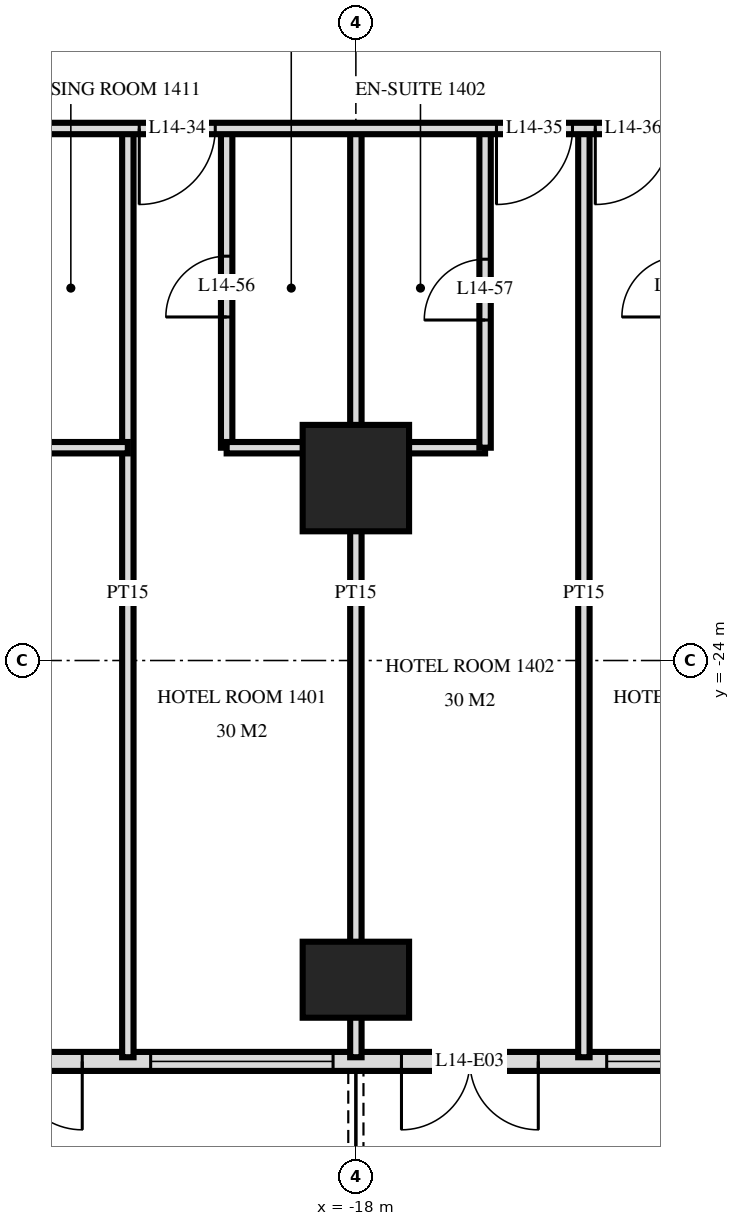
"""IFC4 building model, lengths in metres.
Left out: names, types, materials, properties, quantities, classifications, styles, units other than length and angle.
Written with IfcOpenShell. Run it as: python <this file> out.ifc"""

import sys

from ifc_helpers import new_model, si_unit, direction, frame, frame_2d, origin, origin_2d, place, context, subcontext, project, spatial, rectangle, extrude, element, fill, save


model = new_model("IFC4")
c1 = context("Model", 3, precision=1e-05, world=origin(), true_north=direction((0.0, 1.0)))
c2 = subcontext(c1, "Body", "Model", "MODEL_VIEW")
j1 = project(units=[si_unit("LENGTHUNIT", "METRE"), si_unit("PLANEANGLEUNIT", "RADIAN")], contexts=[c1])
p1 = place(None, origin())
s1 = spatial("IfcSite", under=j1, at=p1, CompositionType="ELEMENT")
p2 = place(p1, origin())
s2 = spatial("IfcBuilding", under=s1, at=p2, CompositionType="ELEMENT")
p3 = place(p2, frame((0.0, 0.0, 60.0)))
s3 = spatial("IfcBuildingStorey", under=s2, at=p3, CompositionType="ELEMENT", Elevation=60.0)
p4 = place(p3, frame((-18.0, -28.2, 0.0), z_axis=(0.0, 0.0, 1.0), x_axis=(1.0, 0.0, 0.0)))
e1 = element("IfcColumn", 1, at=p4, inside=s3, PredefinedType="COLUMN", context=c2, shape_type="SweptSolid", body=[
    extrude(rectangle(XDim=1.4, YDim=1.0, at=origin_2d()), origin(), (0.0, 0.0, 1.0), 3.6),
])
p5 = place(p3, frame((-18.0, -21.6, 0.0), z_axis=(0.0, 0.0, 1.0), x_axis=(1.0, 0.0, 0.0)))
e2 = element("IfcColumn", 2, at=p5, inside=s3, PredefinedType="COLUMN", context=c2, shape_type="SweptSolid", body=[
    extrude(rectangle(XDim=1.4, YDim=1.4, at=origin_2d()), origin(), (0.0, 0.0, 1.0), 3.6),
])
p6 = place(p3, frame((-28.775, -29.275, 0.0), z_axis=(0.0, 0.0, 1.0), x_axis=(1.0, 0.0, 0.0)))
e3 = element("IfcWall", 3, at=p6, inside=s3, PredefinedType="SOLIDWALL", context=c2, shape_type="SweptSolid", body=[
    extrude(rectangle(XDim=57.551, YDim=0.25, at=frame_2d((28.775, 0.0))), origin(), (0.0, 0.0, 1.0), 3.32),
])
p7 = place(p6, frame((0.575, 0.0, 0.0)))
e4 = element("IfcOpeningElement", 4, at=p7, cuts=e3, PredefinedType="OPENING", context=c2, shape_type="SweptSolid", body=[
    extrude(rectangle(XDim=1.8, YDim=2.4, at=frame_2d((0.9, 1.2))), frame((0.0, 0.135, 0.0), z_axis=(0.0, -1.0, 0.0), x_axis=(1.0, 0.0, 0.0)), (0.0, 0.0, 1.0), 0.27),
])
p8 = place(p6, frame((5.375, 0.0, 0.0)))
e5 = element("IfcOpeningElement", 5, at=p8, cuts=e3, PredefinedType="OPENING", context=c2, shape_type="SweptSolid", body=[
    extrude(rectangle(XDim=1.8, YDim=2.4, at=frame_2d((0.9, 1.2))), frame((0.0, 0.135, 0.0), z_axis=(0.0, -1.0, 0.0), x_axis=(1.0, 0.0, 0.0)), (0.0, 0.0, 1.0), 0.27),
])
p9 = place(p6, frame((8.075, 0.0, 0.3)))
e6 = element("IfcOpeningElement", 6, at=p9, cuts=e3, PredefinedType="OPENING", context=c2, shape_type="SweptSolid", body=[
    extrude(rectangle(XDim=2.4, YDim=2.1, at=frame_2d((1.2, 1.05))), frame((0.0, 0.135, 0.0), z_axis=(0.0, -1.0, 0.0), x_axis=(1.0, 0.0, 0.0)), (0.0, 0.0, 1.0), 0.27),
])
p10 = place(p6, frame((11.375, 0.0, 0.0)))
e7 = element("IfcOpeningElement", 7, at=p10, cuts=e3, PredefinedType="OPENING", context=c2, shape_type="SweptSolid", body=[
    extrude(rectangle(XDim=1.8, YDim=2.4, at=frame_2d((0.9, 1.2))), frame((0.0, 0.135, 0.0), z_axis=(0.0, -1.0, 0.0), x_axis=(1.0, 0.0, 0.0)), (0.0, 0.0, 1.0), 0.27),
])
p11 = place(p6, frame((14.075, 0.0, 0.3)))
e8 = element("IfcOpeningElement", 8, at=p11, cuts=e3, PredefinedType="OPENING", context=c2, shape_type="SweptSolid", body=[
    extrude(rectangle(XDim=2.4, YDim=2.1, at=frame_2d((1.2, 1.05))), frame((0.0, 0.135, 0.0), z_axis=(0.0, -1.0, 0.0), x_axis=(1.0, 0.0, 0.0)), (0.0, 0.0, 1.0), 0.27),
])
p12 = place(p6, frame((17.375, 0.0, 0.0)))
e9 = element("IfcOpeningElement", 9, at=p12, cuts=e3, PredefinedType="OPENING", context=c2, shape_type="SweptSolid", body=[
    extrude(rectangle(XDim=1.8, YDim=2.4, at=frame_2d((0.9, 1.2))), frame((0.0, 0.135, 0.0), z_axis=(0.0, -1.0, 0.0), x_axis=(1.0, 0.0, 0.0)), (0.0, 0.0, 1.0), 0.27),
])
p13 = place(p6, frame((20.075, 0.0, 0.3)))
e10 = element("IfcOpeningElement", 10, at=p13, cuts=e3, PredefinedType="OPENING", context=c2, shape_type="SweptSolid", body=[
    extrude(rectangle(XDim=2.4, YDim=2.1, at=frame_2d((1.2, 1.05))), frame((0.0, 0.135, 0.0), z_axis=(0.0, -1.0, 0.0), x_axis=(1.0, 0.0, 0.0)), (0.0, 0.0, 1.0), 0.27),
])
p14 = place(p6, frame((23.075, 0.0, 0.3)))
e11 = element("IfcOpeningElement", 11, at=p14, cuts=e3, PredefinedType="OPENING", context=c2, shape_type="SweptSolid", body=[
    extrude(rectangle(XDim=2.4, YDim=2.1, at=frame_2d((1.2, 1.05))), frame((0.0, 0.135, 0.0), z_axis=(0.0, -1.0, 0.0), x_axis=(1.0, 0.0, 0.0)), (0.0, 0.0, 1.0), 0.27),
])
p15 = place(p6, frame((26.375, 0.0, 0.0)))
e12 = element("IfcOpeningElement", 12, at=p15, cuts=e3, PredefinedType="OPENING", context=c2, shape_type="SweptSolid", body=[
    extrude(rectangle(XDim=1.8, YDim=2.4, at=frame_2d((0.9, 1.2))), frame((0.0, 0.135, 0.0), z_axis=(0.0, -1.0, 0.0), x_axis=(1.0, 0.0, 0.0)), (0.0, 0.0, 1.0), 0.27),
])
p16 = place(p6, frame((29.075, 0.0, 0.3)))
e13 = element("IfcOpeningElement", 13, at=p16, cuts=e3, PredefinedType="OPENING", context=c2, shape_type="SweptSolid", body=[
    extrude(rectangle(XDim=2.4, YDim=2.1, at=frame_2d((1.2, 1.05))), frame((0.0, 0.135, 0.0), z_axis=(0.0, -1.0, 0.0), x_axis=(1.0, 0.0, 0.0)), (0.0, 0.0, 1.0), 0.27),
])
p17 = place(p6, frame((32.375, 0.0, 0.0)))
e14 = element("IfcOpeningElement", 14, at=p17, cuts=e3, PredefinedType="OPENING", context=c2, shape_type="SweptSolid", body=[
    extrude(rectangle(XDim=1.8, YDim=2.4, at=frame_2d((0.9, 1.2))), frame((0.0, 0.135, 0.0), z_axis=(0.0, -1.0, 0.0), x_axis=(1.0, 0.0, 0.0)), (0.0, 0.0, 1.0), 0.27),
])
p18 = place(p6, frame((35.375, 0.0, 0.0)))
e15 = element("IfcOpeningElement", 15, at=p18, cuts=e3, PredefinedType="OPENING", context=c2, shape_type="SweptSolid", body=[
    extrude(rectangle(XDim=1.8, YDim=2.4, at=frame_2d((0.9, 1.2))), frame((0.0, 0.135, 0.0), z_axis=(0.0, -1.0, 0.0), x_axis=(1.0, 0.0, 0.0)), (0.0, 0.0, 1.0), 0.27),
])
p19 = place(p6, frame((38.075, 0.0, 0.3)))
e16 = element("IfcOpeningElement", 16, at=p19, cuts=e3, PredefinedType="OPENING", context=c2, shape_type="SweptSolid", body=[
    extrude(rectangle(XDim=2.4, YDim=2.1, at=frame_2d((1.2, 1.05))), frame((0.0, 0.135, 0.0), z_axis=(0.0, -1.0, 0.0), x_axis=(1.0, 0.0, 0.0)), (0.0, 0.0, 1.0), 0.27),
])
p20 = place(p6, frame((41.375, 0.0, 0.0)))
e17 = element("IfcOpeningElement", 17, at=p20, cuts=e3, PredefinedType="OPENING", context=c2, shape_type="SweptSolid", body=[
    extrude(rectangle(XDim=1.8, YDim=2.4, at=frame_2d((0.9, 1.2))), frame((0.0, 0.135, 0.0), z_axis=(0.0, -1.0, 0.0), x_axis=(1.0, 0.0, 0.0)), (0.0, 0.0, 1.0), 0.27),
])
p21 = place(p6, frame((44.075, 0.0, 0.3)))
e18 = element("IfcOpeningElement", 18, at=p21, cuts=e3, PredefinedType="OPENING", context=c2, shape_type="SweptSolid", body=[
    extrude(rectangle(XDim=2.4, YDim=2.1, at=frame_2d((1.2, 1.05))), frame((0.0, 0.135, 0.0), z_axis=(0.0, -1.0, 0.0), x_axis=(1.0, 0.0, 0.0)), (0.0, 0.0, 1.0), 0.27),
])
p22 = place(p6, frame((47.075, 0.0, 0.3)))
e19 = element("IfcOpeningElement", 19, at=p22, cuts=e3, PredefinedType="OPENING", context=c2, shape_type="SweptSolid", body=[
    extrude(rectangle(XDim=2.4, YDim=2.1, at=frame_2d((1.2, 1.05))), frame((0.0, 0.135, 0.0), z_axis=(0.0, -1.0, 0.0), x_axis=(1.0, 0.0, 0.0)), (0.0, 0.0, 1.0), 0.27),
])
p23 = place(p6, frame((50.375, 0.0, 0.0)))
e20 = element("IfcOpeningElement", 20, at=p23, cuts=e3, PredefinedType="OPENING", context=c2, shape_type="SweptSolid", body=[
    extrude(rectangle(XDim=1.8, YDim=2.4, at=frame_2d((0.9, 1.2))), frame((0.0, 0.135, 0.0), z_axis=(0.0, -1.0, 0.0), x_axis=(1.0, 0.0, 0.0)), (0.0, 0.0, 1.0), 0.27),
])
p24 = place(p6, frame((53.375, 0.0, 0.0)))
e21 = element("IfcOpeningElement", 21, at=p24, cuts=e3, PredefinedType="OPENING", context=c2, shape_type="SweptSolid", body=[
    extrude(rectangle(XDim=1.8, YDim=2.4, at=frame_2d((0.9, 1.2))), frame((0.0, 0.135, 0.0), z_axis=(0.0, -1.0, 0.0), x_axis=(1.0, 0.0, 0.0)), (0.0, 0.0, 1.0), 0.27),
])
p25 = place(p3, frame((-15.0, -29.22, 0.0), z_axis=(0.0, 0.0, 1.0), x_axis=(0.0, 1.0, 0.0)))
e22 = element("IfcWall", 22, at=p25, inside=s3, PredefinedType="PARTITIONING", context=c2, shape_type="SweptSolid", body=[
    extrude(rectangle(XDim=12.22, YDim=0.15, at=frame_2d((6.11, 0.0))), origin(), (0.0, 0.0, 1.0), 3.32),
])
p26 = place(p3, frame((-16.3, -21.2, 0.0), z_axis=(0.0, 0.0, 1.0), x_axis=(0.0, 1.0, 0.0)))
e23 = element("IfcWall", 23, at=p26, inside=s3, PredefinedType="PARTITIONING", context=c2, shape_type="SweptSolid", body=[
    extrude(rectangle(XDim=4.2, YDim=0.15, at=frame_2d((2.1, 0.0))), origin(), (0.0, 0.0, 1.0), 3.32),
])
p27 = place(p26, frame((1.68, 0.0, 0.0)))
e24 = element("IfcOpeningElement", 24, at=p27, cuts=e23, PredefinedType="OPENING", context=c2, shape_type="SweptSolid", body=[
    extrude(rectangle(XDim=0.8, YDim=2.1, at=frame_2d((0.4, 1.05))), frame((0.0, 0.085, 0.0), z_axis=(0.0, -1.0, 0.0), x_axis=(1.0, 0.0, 0.0)), (0.0, 0.0, 1.0), 0.17),
])
p28 = place(p3, frame((-18.0, -29.22, 0.0), z_axis=(0.0, 0.0, 1.0), x_axis=(0.0, 1.0, 0.0)))
e25 = element("IfcWall", 25, at=p28, inside=s3, PredefinedType="PARTITIONING", context=c2, shape_type="SweptSolid", body=[
    extrude(rectangle(XDim=12.22, YDim=0.15, at=frame_2d((6.11, 0.0))), origin(), (0.0, 0.0, 1.0), 3.32),
])
p29 = place(p3, frame((-19.7, -21.2, 0.0), z_axis=(0.0, 0.0, 1.0), x_axis=(0.0, 1.0, 0.0)))
e26 = element("IfcWall", 26, at=p29, inside=s3, PredefinedType="PARTITIONING", context=c2, shape_type="SweptSolid", body=[
    extrude(rectangle(XDim=4.2, YDim=0.15, at=frame_2d((2.1, 0.0))), origin(), (0.0, 0.0, 1.0), 3.32),
])
p30 = place(p29, frame((1.72, 0.0, 0.0)))
e27 = element("IfcOpeningElement", 27, at=p30, cuts=e26, PredefinedType="OPENING", context=c2, shape_type="SweptSolid", body=[
    extrude(rectangle(XDim=0.8, YDim=2.1, at=frame_2d((0.4, 1.05))), frame((0.0, 0.085, 0.0), z_axis=(0.0, -1.0, 0.0), x_axis=(1.0, 0.0, 0.0)), (0.0, 0.0, 1.0), 0.17),
])
p31 = place(p3, frame((-21.0, -29.22, 0.0), z_axis=(0.0, 0.0, 1.0), x_axis=(0.0, 1.0, 0.0)))
e28 = element("IfcWall", 28, at=p31, inside=s3, PredefinedType="PARTITIONING", context=c2, shape_type="SweptSolid", body=[
    extrude(rectangle(XDim=12.22, YDim=0.15, at=frame_2d((6.11, 0.0))), origin(), (0.0, 0.0, 1.0), 3.32),
])
p32 = place(p3, frame((-22.5, -21.2, 0.0), z_axis=(0.0, 0.0, 1.0), x_axis=(1.0, 0.0, 0.0)))
e29 = element("IfcWall", 29, at=p32, inside=s3, PredefinedType="PARTITIONING", context=c2, shape_type="SweptSolid", body=[
    extrude(rectangle(XDim=1.5, YDim=0.15, at=frame_2d((0.75, 0.0))), origin(), (0.0, 0.0, 1.0), 3.32),
])
p33 = place(p3, frame((-19.7, -21.2, 0.0), z_axis=(0.0, 0.0, 1.0), x_axis=(1.0, 0.0, 0.0)))
e30 = element("IfcWall", 30, at=p33, inside=s3, PredefinedType="PARTITIONING", context=c2, shape_type="SweptSolid", body=[
    extrude(rectangle(XDim=3.4, YDim=0.15, at=frame_2d((1.7, 0.0))), origin(), (0.0, 0.0, 1.0), 3.32),
])
p34 = place(p3, frame((-33.12, -17.0, 0.0), z_axis=(0.0, 0.0, 1.0), x_axis=(1.0, 0.0, 0.0)))
e31 = element("IfcWall", 31, at=p34, inside=s3, PredefinedType="PARTITIONING", context=c2, shape_type="SweptSolid", body=[
    extrude(rectangle(XDim=66.24, YDim=0.15, at=frame_2d((33.12, 0.0))), origin(), (0.0, 0.0, 1.0), 3.32),
])
p35 = place(p34, frame((12.27, 0.0, 0.0)))
e32 = element("IfcOpeningElement", 32, at=p35, cuts=e31, PredefinedType="OPENING", context=c2, shape_type="SweptSolid", body=[
    extrude(rectangle(XDim=1.0, YDim=2.1, at=frame_2d((0.5, 1.05))), frame((0.0, 0.085, 0.0), z_axis=(0.0, -1.0, 0.0), x_axis=(1.0, 0.0, 0.0)), (0.0, 0.0, 1.0), 0.17),
])
p36 = place(p34, frame((16.97, 0.0, 0.0)))
e33 = element("IfcOpeningElement", 33, at=p36, cuts=e31, PredefinedType="OPENING", context=c2, shape_type="SweptSolid", body=[
    extrude(rectangle(XDim=1.0, YDim=2.1, at=frame_2d((0.5, 1.05))), frame((0.0, 0.085, 0.0), z_axis=(0.0, -1.0, 0.0), x_axis=(1.0, 0.0, 0.0)), (0.0, 0.0, 1.0), 0.17),
])
p37 = place(p34, frame((18.27, 0.0, 0.0)))
e34 = element("IfcOpeningElement", 34, at=p37, cuts=e31, PredefinedType="OPENING", context=c2, shape_type="SweptSolid", body=[
    extrude(rectangle(XDim=1.0, YDim=2.1, at=frame_2d((0.5, 1.05))), frame((0.0, 0.085, 0.0), z_axis=(0.0, -1.0, 0.0), x_axis=(1.0, 0.0, 0.0)), (0.0, 0.0, 1.0), 0.17),
])
p38 = place(p34, frame((22.97, 0.0, 0.0)))
e35 = element("IfcOpeningElement", 35, at=p38, cuts=e31, PredefinedType="OPENING", context=c2, shape_type="SweptSolid", body=[
    extrude(rectangle(XDim=1.0, YDim=2.1, at=frame_2d((0.5, 1.05))), frame((0.0, 0.085, 0.0), z_axis=(0.0, -1.0, 0.0), x_axis=(1.0, 0.0, 0.0)), (0.0, 0.0, 1.0), 0.17),
])
p39 = place(p34, frame((24.27, 0.0, 0.0)))
e36 = element("IfcOpeningElement", 36, at=p39, cuts=e31, PredefinedType="OPENING", context=c2, shape_type="SweptSolid", body=[
    extrude(rectangle(XDim=1.0, YDim=2.1, at=frame_2d((0.5, 1.05))), frame((0.0, 0.085, 0.0), z_axis=(0.0, -1.0, 0.0), x_axis=(1.0, 0.0, 0.0)), (0.0, 0.0, 1.0), 0.17),
])
p40 = place(p34, frame((28.97, 0.0, 0.0)))
e37 = element("IfcOpeningElement", 37, at=p40, cuts=e31, PredefinedType="OPENING", context=c2, shape_type="SweptSolid", body=[
    extrude(rectangle(XDim=1.0, YDim=2.1, at=frame_2d((0.5, 1.05))), frame((0.0, 0.085, 0.0), z_axis=(0.0, -1.0, 0.0), x_axis=(1.0, 0.0, 0.0)), (0.0, 0.0, 1.0), 0.17),
])
p41 = place(p34, frame((30.27, 0.0, 0.0)))
e38 = element("IfcOpeningElement", 38, at=p41, cuts=e31, PredefinedType="OPENING", context=c2, shape_type="SweptSolid", body=[
    extrude(rectangle(XDim=1.0, YDim=2.1, at=frame_2d((0.5, 1.05))), frame((0.0, 0.085, 0.0), z_axis=(0.0, -1.0, 0.0), x_axis=(1.0, 0.0, 0.0)), (0.0, 0.0, 1.0), 0.17),
])
p42 = place(p34, frame((33.82, 0.0, 0.0)))
e39 = element("IfcOpeningElement", 39, at=p42, cuts=e31, PredefinedType="OPENING", context=c2, shape_type="SweptSolid", body=[
    extrude(rectangle(XDim=1.0, YDim=2.1, at=frame_2d((0.5, 1.05))), frame((0.0, 0.085, 0.0), z_axis=(0.0, -1.0, 0.0), x_axis=(1.0, 0.0, 0.0)), (0.0, 0.0, 1.0), 0.17),
])
p43 = place(p34, frame((46.27, 0.0, 0.0)))
e40 = element("IfcOpeningElement", 40, at=p43, cuts=e31, PredefinedType="OPENING", context=c2, shape_type="SweptSolid", body=[
    extrude(rectangle(XDim=1.0, YDim=2.1, at=frame_2d((0.5, 1.05))), frame((0.0, 0.085, 0.0), z_axis=(0.0, -1.0, 0.0), x_axis=(1.0, 0.0, 0.0)), (0.0, 0.0, 1.0), 0.17),
])
p44 = place(p34, frame((52.97, 0.0, 0.0)))
e41 = element("IfcOpeningElement", 41, at=p44, cuts=e31, PredefinedType="OPENING", context=c2, shape_type="SweptSolid", body=[
    extrude(rectangle(XDim=1.0, YDim=2.1, at=frame_2d((0.5, 1.05))), frame((0.0, 0.085, 0.0), z_axis=(0.0, -1.0, 0.0), x_axis=(1.0, 0.0, 0.0)), (0.0, 0.0, 1.0), 0.17),
])
p45 = place(p34, frame((6.05, 0.0, 0.0)))
e42 = element("IfcOpeningElement", 42, at=p45, cuts=e31, PredefinedType="OPENING", context=c2, shape_type="SweptSolid", body=[
    extrude(rectangle(XDim=1.0, YDim=2.1, at=frame_2d((0.5, 1.05))), frame((0.0, 0.085, 0.0), z_axis=(0.0, -1.0, 0.0), x_axis=(1.0, 0.0, 0.0)), (0.0, 0.0, 1.0), 0.17),
])
p46 = place(p34, frame((59.15, 0.0, 0.0)))
e43 = element("IfcOpeningElement", 43, at=p46, cuts=e31, PredefinedType="OPENING", context=c2, shape_type="SweptSolid", body=[
    extrude(rectangle(XDim=1.0, YDim=2.1, at=frame_2d((0.5, 1.05))), frame((0.0, 0.085, 0.0), z_axis=(0.0, -1.0, 0.0), x_axis=(1.0, 0.0, 0.0)), (0.0, 0.0, 1.0), 0.17),
])
p47 = place(p8, frame((0.9, 0.0, 0.0), z_axis=(0.0, 0.0, 1.0), x_axis=(-1.0, 0.0, 0.0)))
e44 = element("IfcDoor", 44, at=p47, inside=s3, OperationType="DOUBLE_DOOR_SINGLE_SWING", PredefinedType="DOOR", context=c2, shape_type="SweptSolid", body=[
    extrude(rectangle(XDim=1.8, YDim=2.4, at=frame_2d((0.0, 1.2))), frame((0.0, -0.025, 0.0), z_axis=(0.0, 1.0, 0.0), x_axis=(-1.0, 0.0, 0.0)), (0.0, 0.0, 1.0), 0.05),
])
fill(e5, e44)
p48 = place(p9, origin())
e45 = element("IfcWindow", 45, at=p48, inside=s3, PartitioningType="SINGLE_PANEL", PredefinedType="WINDOW", context=c2, shape_type="SweptSolid", body=[
    extrude(rectangle(XDim=2.4, YDim=2.1, at=frame_2d((1.2, 1.05))), frame((0.0, 0.03, 0.0), z_axis=(0.0, -1.0, 0.0), x_axis=(1.0, 0.0, 0.0)), (0.0, 0.0, 1.0), 0.06),
])
fill(e6, e45)
p49 = place(p10, frame((0.9, 0.0, 0.0), z_axis=(0.0, 0.0, 1.0), x_axis=(-1.0, 0.0, 0.0)))
e46 = element("IfcDoor", 46, at=p49, inside=s3, OperationType="DOUBLE_DOOR_SINGLE_SWING", PredefinedType="DOOR", context=c2, shape_type="SweptSolid", body=[
    extrude(rectangle(XDim=1.8, YDim=2.4, at=frame_2d((0.0, 1.2))), frame((0.0, -0.025, 0.0), z_axis=(0.0, 1.0, 0.0), x_axis=(-1.0, 0.0, 0.0)), (0.0, 0.0, 1.0), 0.05),
])
fill(e7, e46)
p50 = place(p11, origin())
e47 = element("IfcWindow", 47, at=p50, inside=s3, PartitioningType="SINGLE_PANEL", PredefinedType="WINDOW", context=c2, shape_type="SweptSolid", body=[
    extrude(rectangle(XDim=2.4, YDim=2.1, at=frame_2d((1.2, 1.05))), frame((0.0, 0.03, 0.0), z_axis=(0.0, -1.0, 0.0), x_axis=(1.0, 0.0, 0.0)), (0.0, 0.0, 1.0), 0.06),
])
fill(e8, e47)
p51 = place(p35, frame((0.5, 0.0, 0.0), z_axis=(0.0, 0.0, 1.0), x_axis=(-1.0, 0.0, 0.0)))
e48 = element("IfcDoor", 48, at=p51, inside=s3, OperationType="SINGLE_SWING_LEFT", PredefinedType="DOOR", context=c2, shape_type="SweptSolid", body=[
    extrude(rectangle(XDim=1.0, YDim=2.1, at=frame_2d((0.0, 1.05))), frame((0.0, -0.025, 0.0), z_axis=(0.0, 1.0, 0.0), x_axis=(-1.0, 0.0, 0.0)), (0.0, 0.0, 1.0), 0.05),
])
fill(e32, e48)
p52 = place(p36, frame((0.5, 0.0, 0.0), z_axis=(0.0, 0.0, 1.0), x_axis=(-1.0, 0.0, 0.0)))
e49 = element("IfcDoor", 49, at=p52, inside=s3, OperationType="SINGLE_SWING_LEFT", PredefinedType="DOOR", context=c2, shape_type="SweptSolid", body=[
    extrude(rectangle(XDim=1.0, YDim=2.1, at=frame_2d((0.0, 1.05))), frame((0.0, -0.025, 0.0), z_axis=(0.0, 1.0, 0.0), x_axis=(-1.0, 0.0, 0.0)), (0.0, 0.0, 1.0), 0.05),
])
fill(e33, e49)
p53 = place(p37, frame((0.5, 0.0, 0.0), z_axis=(0.0, 0.0, 1.0), x_axis=(-1.0, 0.0, 0.0)))
e50 = element("IfcDoor", 50, at=p53, inside=s3, OperationType="SINGLE_SWING_LEFT", PredefinedType="DOOR", context=c2, shape_type="SweptSolid", body=[
    extrude(rectangle(XDim=1.0, YDim=2.1, at=frame_2d((0.0, 1.05))), frame((0.0, -0.025, 0.0), z_axis=(0.0, 1.0, 0.0), x_axis=(-1.0, 0.0, 0.0)), (0.0, 0.0, 1.0), 0.05),
])
fill(e34, e50)
p54 = place(p30, origin())
e51 = element("IfcDoor", 51, at=p54, inside=s3, OperationType="SINGLE_SWING_RIGHT", PredefinedType="DOOR", context=c2, shape_type="SweptSolid", body=[
    extrude(rectangle(XDim=0.8, YDim=2.1, at=frame_2d((0.4, 1.05))), frame((0.0, 0.025, 0.0), z_axis=(0.0, -1.0, 0.0), x_axis=(1.0, 0.0, 0.0)), (0.0, 0.0, 1.0), 0.05),
])
fill(e27, e51)
p55 = place(p27, origin())
e52 = element("IfcDoor", 52, at=p55, inside=s3, OperationType="SINGLE_SWING_RIGHT", PredefinedType="DOOR", context=c2, shape_type="SweptSolid", body=[
    extrude(rectangle(XDim=0.8, YDim=2.1, at=frame_2d((0.4, 1.05))), frame((0.0, 0.025, 0.0), z_axis=(0.0, -1.0, 0.0), x_axis=(1.0, 0.0, 0.0)), (0.0, 0.0, 1.0), 0.05),
])
fill(e24, e52)
save(model, sys.argv[1])
